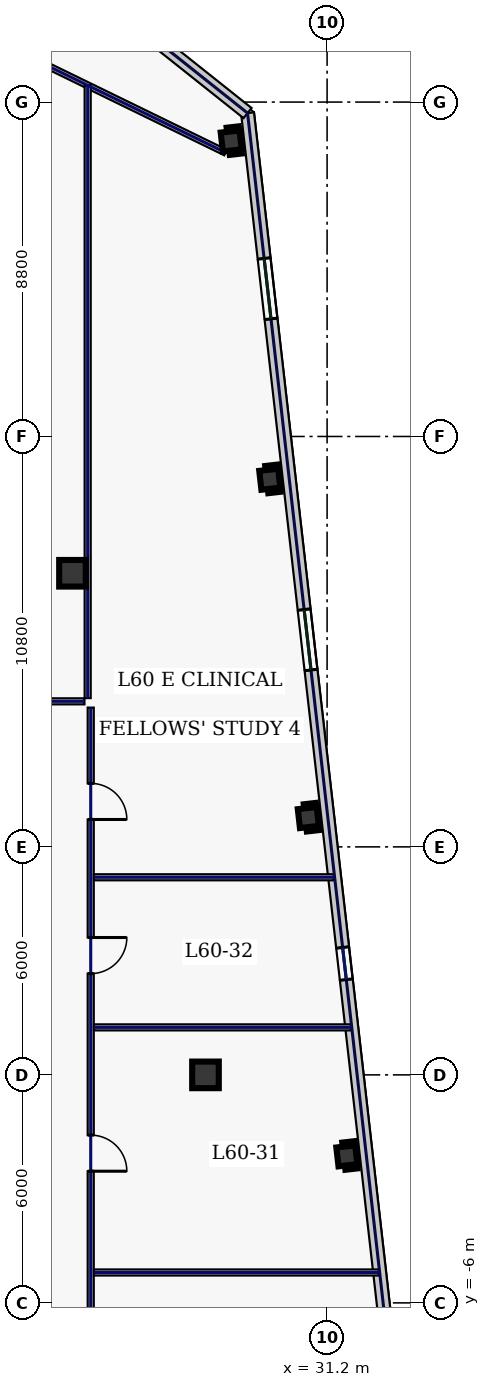
"""IFC4 building model, lengths in metres.
Left out: names, types, materials, properties, quantities, classifications, styles, units other than length and angle.
Written with IfcOpenShell. Run it as: python <this file> out.ifc"""

import sys

from ifc_helpers import new_model, si_unit, direction, frame, frame_2d, origin, origin_2d, place, context, subcontext, project, spatial, rectangle, hollow_rectangle, extrude, element, fill, save


model = new_model("IFC4")
c1 = context("Model", 3, precision=1e-05, world=origin(), true_north=direction((0.0, 1.0)))
c2 = subcontext(c1, "Body", "Model", "MODEL_VIEW")
j1 = project(units=[si_unit("LENGTHUNIT", "METRE"), si_unit("PLANEANGLEUNIT", "RADIAN")], contexts=[c1])
p1 = place(None, origin())
s1 = spatial("IfcSite", under=j1, at=p1, CompositionType="ELEMENT")
p2 = place(p1, origin())
s2 = spatial("IfcBuilding", under=s1, at=p2, CompositionType="ELEMENT")
p3 = place(p2, frame((0.0, 0.0, 259.0)))
s3 = spatial("IfcBuildingStorey", under=s2, at=p3, CompositionType="ELEMENT", Elevation=259.0)
for number, where, z_axis, x_axis in (
    (1, (24.5, 13.2, 0.0), (0.0, 0.0, 1.0), (1.0, 0.0, 0.0)),
    (2, (28.0, 0.0, 0.0), (0.0, 0.0, 1.0), (1.0, 0.0, 0.0)),
):
    element("IfcColumn", number, at=place(p3, frame(where, z_axis=z_axis, x_axis=x_axis)), inside=s3, PredefinedType="COLUMN", context=c2, shape_type="SweptSolid", body=[
        extrude(hollow_rectangle(XDim=0.7, YDim=0.7, WallThickness=0.032, at=origin_2d()), origin(), (0.0, 0.0, 1.0), 3.74),
    ])
for number, where, z_axis, x_axis in (
    (3, (31.72, -2.131, 0.0), (0.0, 0.0, 1.0), (0.994, 0.113, 0.0)),
    (4, (30.706, 6.772, 0.0), (0.0, 0.0, 1.0), (0.994, 0.113, 0.0)),
    (5, (29.691, 15.674, 0.0), (0.0, 0.0, 1.0), (0.994, 0.113, 0.0)),
    (6, (28.677, 24.577, 0.0), (0.0, 0.0, 1.0), (0.994, 0.113, 0.0)),
):
    element("IfcColumn", number, at=place(p3, frame(where, z_axis=z_axis, x_axis=x_axis)), inside=s3, PredefinedType="COLUMN", context=c2, shape_type="SweptSolid", body=[
        extrude(hollow_rectangle(XDim=0.5, YDim=0.5, WallThickness=0.025, at=origin_2d()), origin(), (0.0, 0.0, 1.0), 3.74),
    ])
p4 = place(p3, frame((33.318, -11.651, 0.0), z_axis=(0.0, 0.0, 1.0), x_axis=(-0.11320360501, 0.9935718111, 0.0)))
e7 = element("IfcWall", 7, at=p4, inside=s3, PredefinedType="STANDARD", context=c2, shape_type="SweptSolid", body=[
    extrude(rectangle(XDim=37.2, YDim=0.34, at=frame_2d((18.6, 0.0))), origin(), (0.0, 0.0, 1.0), 3.74),
])
p5 = place(p4, frame((3.85, 0.0, 0.58)))
e8 = element("IfcOpeningElement", 8, at=p5, cuts=e7, PredefinedType="OPENING", context=c2, shape_type="SweptSolid", body=[
    extrude(rectangle(XDim=1.6, YDim=2.3, at=frame_2d((0.8, 1.15))), frame((0.0, 0.18, 0.0), z_axis=(0.0, -1.0, 0.0), x_axis=(1.0, 0.0, 0.0)), (0.0, 0.0, 1.0), 0.36),
])
p6 = place(p4, frame((14.25, 0.0, 0.75)))
e9 = element("IfcOpeningElement", 9, at=p6, cuts=e7, PredefinedType="OPENING", context=c2, shape_type="SweptSolid", body=[
    extrude(rectangle(XDim=0.85, YDim=1.85, at=frame_2d((0.425, 0.925))), frame((0.0, 0.18, 0.0), z_axis=(0.0, -1.0, 0.0), x_axis=(1.0, 0.0, 0.0)), (0.0, 0.0, 1.0), 0.36),
])
p7 = place(p4, frame((22.45, 0.0, 0.58)))
e10 = element("IfcOpeningElement", 10, at=p7, cuts=e7, PredefinedType="OPENING", context=c2, shape_type="SweptSolid", body=[
    extrude(rectangle(XDim=1.6, YDim=2.3, at=frame_2d((0.8, 1.15))), frame((0.0, 0.18, 0.0), z_axis=(0.0, -1.0, 0.0), x_axis=(1.0, 0.0, 0.0)), (0.0, 0.0, 1.0), 0.36),
])
p8 = place(p4, frame((31.75, 0.0, 0.58)))
e11 = element("IfcOpeningElement", 11, at=p8, cuts=e7, PredefinedType="OPENING", context=c2, shape_type="SweptSolid", body=[
    extrude(rectangle(XDim=1.6, YDim=2.3, at=frame_2d((0.8, 1.15))), frame((0.0, 0.18, 0.0), z_axis=(0.0, -1.0, 0.0), x_axis=(1.0, 0.0, 0.0)), (0.0, 0.0, 1.0), 0.36),
])
p9 = place(p3, frame((29.107, 25.31, 0.0), z_axis=(0.0, 0.0, 1.0), x_axis=(-0.78259733853, 0.62252823689, 0.0)))
e12 = element("IfcWall", 12, at=p9, inside=s3, PredefinedType="STANDARD", context=c2, shape_type="SweptSolid", body=[
    extrude(rectangle(XDim=6.548, YDim=0.34, at=frame_2d((3.274, 0.0))), origin(), (0.0, 0.0, 1.0), 3.74),
])
p10 = place(p3, frame((28.528, 24.271, 0.0), z_axis=(0.0, 0.0, 1.0), x_axis=(-0.898820692789, 0.438316509173, 0.0)))
e13 = element("IfcWall", 13, at=p10, inside=s3, PredefinedType="PARTITIONING", context=c2, shape_type="SweptSolid", body=[
    extrude(rectangle(XDim=6.107, YDim=0.16, at=frame_2d((3.053, 0.0))), origin(), (0.0, 0.0, 1.0), 3.74),
])
p11 = place(p3, frame((-24.815, 9.83, 0.0), z_axis=(0.0, 0.0, 1.0), x_axis=(1.0, 0.0, 0.0)))
e14 = element("IfcWall", 14, at=p11, inside=s3, PredefinedType="PARTITIONING", context=c2, shape_type="SweptSolid", body=[
    extrude(rectangle(XDim=49.63, YDim=0.16, at=frame_2d((24.815, 0.0))), origin(), (0.0, 0.0, 1.0), 3.74),
])
p12 = place(p11, frame((1.869, 0.0, 0.0)))
e15 = element("IfcOpeningElement", 15, at=p12, cuts=e14, PredefinedType="OPENING", context=c2, shape_type="SweptSolid", body=[
    extrude(rectangle(XDim=1.3, YDim=2.2, at=frame_2d((0.65, 1.1))), frame((0.0, 0.09, 0.0), z_axis=(0.0, -1.0, 0.0), x_axis=(1.0, 0.0, 0.0)), (0.0, 0.0, 1.0), 0.18),
])
p13 = place(p11, frame((7.613, 0.0, 0.0)))
e16 = element("IfcOpeningElement", 16, at=p13, cuts=e14, PredefinedType="OPENING", context=c2, shape_type="SweptSolid", body=[
    extrude(rectangle(XDim=0.95, YDim=2.2, at=frame_2d((0.475, 1.1))), frame((0.0, 0.09, 0.0), z_axis=(0.0, -1.0, 0.0), x_axis=(1.0, 0.0, 0.0)), (0.0, 0.0, 1.0), 0.18),
])
p14 = place(p11, frame((14.038, 0.0, 0.0)))
e17 = element("IfcOpeningElement", 17, at=p14, cuts=e14, PredefinedType="OPENING", context=c2, shape_type="SweptSolid", body=[
    extrude(rectangle(XDim=0.95, YDim=2.2, at=frame_2d((0.475, 1.1))), frame((0.0, 0.09, 0.0), z_axis=(0.0, -1.0, 0.0), x_axis=(1.0, 0.0, 0.0)), (0.0, 0.0, 1.0), 0.18),
])
p15 = place(p11, frame((21.125, 0.0, 0.0)))
e18 = element("IfcOpeningElement", 18, at=p15, cuts=e14, PredefinedType="OPENING", context=c2, shape_type="SweptSolid", body=[
    extrude(rectangle(XDim=1.3, YDim=2.2, at=frame_2d((0.65, 1.1))), frame((0.0, 0.09, 0.0), z_axis=(0.0, -1.0, 0.0), x_axis=(1.0, 0.0, 0.0)), (0.0, 0.0, 1.0), 0.18),
])
p16 = place(p11, frame((29.225, 0.0, 0.0)))
e19 = element("IfcOpeningElement", 19, at=p16, cuts=e14, PredefinedType="OPENING", context=c2, shape_type="SweptSolid", body=[
    extrude(rectangle(XDim=1.3, YDim=2.2, at=frame_2d((0.65, 1.1))), frame((0.0, 0.09, 0.0), z_axis=(0.0, -1.0, 0.0), x_axis=(1.0, 0.0, 0.0)), (0.0, 0.0, 1.0), 0.18),
])
p17 = place(p11, frame((36.312, 0.0, 0.0)))
e20 = element("IfcOpeningElement", 20, at=p17, cuts=e14, PredefinedType="OPENING", context=c2, shape_type="SweptSolid", body=[
    extrude(rectangle(XDim=0.95, YDim=2.2, at=frame_2d((0.475, 1.1))), frame((0.0, 0.09, 0.0), z_axis=(0.0, -1.0, 0.0), x_axis=(1.0, 0.0, 0.0)), (0.0, 0.0, 1.0), 0.18),
])
p18 = place(p11, frame((41.863, 0.0, 0.0)))
e21 = element("IfcOpeningElement", 21, at=p18, cuts=e14, PredefinedType="OPENING", context=c2, shape_type="SweptSolid", body=[
    extrude(rectangle(XDim=1.3, YDim=2.2, at=frame_2d((0.65, 1.1))), frame((0.0, 0.09, 0.0), z_axis=(0.0, -1.0, 0.0), x_axis=(1.0, 0.0, 0.0)), (0.0, 0.0, 1.0), 0.18),
])
p19 = place(p11, frame((46.806, 0.0, 0.0)))
e22 = element("IfcOpeningElement", 22, at=p19, cuts=e14, PredefinedType="OPENING", context=c2, shape_type="SweptSolid", body=[
    extrude(rectangle(XDim=0.95, YDim=2.2, at=frame_2d((0.475, 1.1))), frame((0.0, 0.09, 0.0), z_axis=(0.0, -1.0, 0.0), x_axis=(1.0, 0.0, 0.0)), (0.0, 0.0, 1.0), 0.18),
])
p20 = place(p3, frame((24.98, 9.665, 0.0), z_axis=(0.0, 0.0, 1.0), x_axis=(0.0, -1.0, 0.0)))
e23 = element("IfcWall", 23, at=p20, inside=s3, PredefinedType="PARTITIONING", context=c2, shape_type="SweptSolid", body=[
    extrude(rectangle(XDim=19.28, YDim=0.16, at=frame_2d((9.64, 0.0))), origin(), (0.0, 0.0, 1.0), 3.74),
])
p21 = place(p20, frame((16.531, 0.0, 0.0)))
e24 = element("IfcOpeningElement", 24, at=p21, cuts=e23, PredefinedType="OPENING", context=c2, shape_type="SweptSolid", body=[
    extrude(rectangle(XDim=0.95, YDim=2.2, at=frame_2d((0.475, 1.1))), frame((0.0, 0.09, 0.0), z_axis=(0.0, -1.0, 0.0), x_axis=(1.0, 0.0, 0.0)), (0.0, 0.0, 1.0), 0.18),
])
p22 = place(p20, frame((11.25, 0.0, 0.0)))
e25 = element("IfcOpeningElement", 25, at=p22, cuts=e23, PredefinedType="OPENING", context=c2, shape_type="SweptSolid", body=[
    extrude(rectangle(XDim=0.95, YDim=2.2, at=frame_2d((0.475, 1.1))), frame((0.0, 0.09, 0.0), z_axis=(0.0, -1.0, 0.0), x_axis=(1.0, 0.0, 0.0)), (0.0, 0.0, 1.0), 0.18),
])
p23 = place(p20, frame((6.05, 0.0, 0.0)))
e26 = element("IfcOpeningElement", 26, at=p23, cuts=e23, PredefinedType="OPENING", context=c2, shape_type="SweptSolid", body=[
    extrude(rectangle(XDim=0.95, YDim=2.2, at=frame_2d((0.475, 1.1))), frame((0.0, 0.09, 0.0), z_axis=(0.0, -1.0, 0.0), x_axis=(1.0, 0.0, 0.0)), (0.0, 0.0, 1.0), 0.18),
])
p24 = place(p20, frame((1.994, 0.0, 0.0)))
e27 = element("IfcOpeningElement", 27, at=p24, cuts=e23, PredefinedType="OPENING", context=c2, shape_type="SweptSolid", body=[
    extrude(rectangle(XDim=0.95, YDim=2.2, at=frame_2d((0.475, 1.1))), frame((0.0, 0.09, 0.0), z_axis=(0.0, -1.0, 0.0), x_axis=(1.0, 0.0, 0.0)), (0.0, 0.0, 1.0), 0.18),
])
p25 = place(p3, frame((24.9, 9.915, 0.0), z_axis=(0.0, 0.0, 1.0), x_axis=(0.0, 1.0, 0.0)))
e28 = element("IfcWall", 28, at=p25, inside=s3, PredefinedType="PARTITIONING", context=c2, shape_type="SweptSolid", body=[
    extrude(rectangle(XDim=16.129, YDim=0.16, at=frame_2d((8.065, 0.0))), origin(), (0.0, 0.0, 1.0), 3.74),
])
p26 = place(p3, frame((25.065, -5.2, 0.0), z_axis=(0.0, 0.0, 1.0), x_axis=(1.0, 0.0, 0.0)))
e29 = element("IfcWall", 29, at=p26, inside=s3, PredefinedType="PARTITIONING", context=c2, shape_type="SweptSolid", body=[
    extrude(rectangle(XDim=7.498, YDim=0.16, at=frame_2d((3.749, 0.0))), origin(), (0.0, 0.0, 1.0), 3.74),
])
p27 = place(p3, frame((25.065, 1.25, 0.0), z_axis=(0.0, 0.0, 1.0), x_axis=(1.0, 0.0, 0.0)))
e30 = element("IfcWall", 30, at=p27, inside=s3, PredefinedType="PARTITIONING", context=c2, shape_type="SweptSolid", body=[
    extrude(rectangle(XDim=6.763, YDim=0.16, at=frame_2d((3.382, 0.0))), origin(), (0.0, 0.0, 1.0), 3.74),
])
p28 = place(p3, frame((25.065, 5.2, 0.0), z_axis=(0.0, 0.0, 1.0), x_axis=(1.0, 0.0, 0.0)))
e31 = element("IfcWall", 31, at=p28, inside=s3, PredefinedType="PARTITIONING", context=c2, shape_type="SweptSolid", body=[
    extrude(rectangle(XDim=6.313, YDim=0.16, at=frame_2d((3.157, 0.0))), origin(), (0.0, 0.0, 1.0), 3.74),
])
p29 = place(p6, origin())
e32 = element("IfcWindow", 32, at=p29, inside=s3, PartitioningType="SINGLE_PANEL", PredefinedType="WINDOW", context=c2, shape_type="SweptSolid", body=[
    extrude(rectangle(XDim=0.85, YDim=1.85, at=frame_2d((0.425, 0.925))), frame((0.0, 0.03, 0.0), z_axis=(0.0, -1.0, 0.0), x_axis=(1.0, 0.0, 0.0)), (0.0, 0.0, 1.0), 0.06),
])
fill(e9, e32)
p30 = place(p7, origin())
e33 = element("IfcWindow", 33, at=p30, inside=s3, PartitioningType="SINGLE_PANEL", PredefinedType="WINDOW", context=c2, shape_type="SweptSolid", body=[
    extrude(rectangle(XDim=1.6, YDim=2.3, at=frame_2d((0.8, 1.15))), frame((0.0, 0.03, 0.0), z_axis=(0.0, -1.0, 0.0), x_axis=(1.0, 0.0, 0.0)), (0.0, 0.0, 1.0), 0.06),
])
fill(e10, e33)
p31 = place(p8, origin())
e34 = element("IfcWindow", 34, at=p31, inside=s3, PartitioningType="SINGLE_PANEL", PredefinedType="WINDOW", context=c2, shape_type="SweptSolid", body=[
    extrude(rectangle(XDim=1.6, YDim=2.3, at=frame_2d((0.8, 1.15))), frame((0.0, 0.03, 0.0), z_axis=(0.0, -1.0, 0.0), x_axis=(1.0, 0.0, 0.0)), (0.0, 0.0, 1.0), 0.06),
])
fill(e11, e34)
p32 = place(p22, origin())
e35 = element("IfcDoor", 35, at=p32, inside=s3, OperationType="SINGLE_SWING_RIGHT", PredefinedType="DOOR", context=c2, shape_type="SweptSolid", body=[
    extrude(rectangle(XDim=0.95, YDim=2.2, at=frame_2d((0.475, 1.1))), frame((0.0, 0.025, 0.0), z_axis=(0.0, -1.0, 0.0), x_axis=(1.0, 0.0, 0.0)), (0.0, 0.0, 1.0), 0.05),
])
fill(e25, e35)
p33 = place(p23, origin())
e36 = element("IfcDoor", 36, at=p33, inside=s3, OperationType="SINGLE_SWING_LEFT", PredefinedType="DOOR", context=c2, shape_type="SweptSolid", body=[
    extrude(rectangle(XDim=0.95, YDim=2.2, at=frame_2d((0.475, 1.1))), frame((0.0, 0.025, 0.0), z_axis=(0.0, -1.0, 0.0), x_axis=(1.0, 0.0, 0.0)), (0.0, 0.0, 1.0), 0.05),
])
fill(e26, e36)
p34 = place(p24, origin())
e37 = element("IfcDoor", 37, at=p34, inside=s3, OperationType="SINGLE_SWING_RIGHT", PredefinedType="DOOR", context=c2, shape_type="SweptSolid", body=[
    extrude(rectangle(XDim=0.95, YDim=2.2, at=frame_2d((0.475, 1.1))), frame((0.0, 0.025, 0.0), z_axis=(0.0, -1.0, 0.0), x_axis=(1.0, 0.0, 0.0)), (0.0, 0.0, 1.0), 0.05),
])
fill(e27, e37)
save(model, sys.argv[1])
